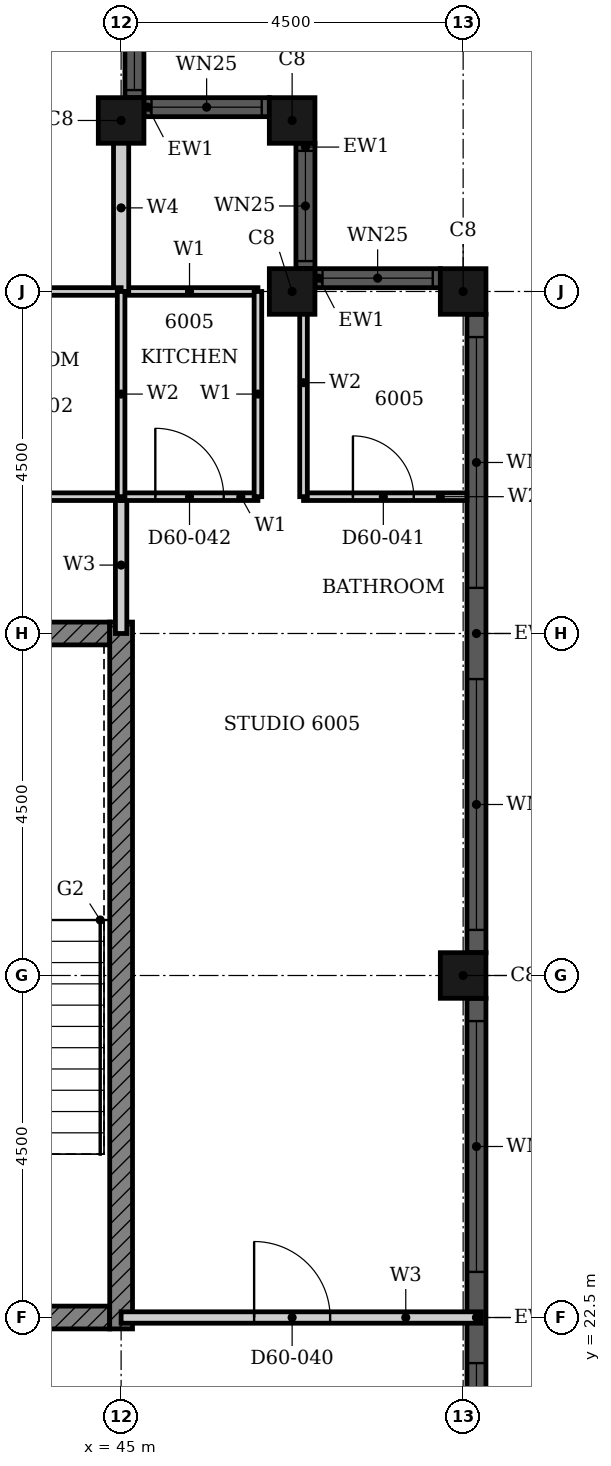
"""IFC4 building model, lengths in metres.
Left out: names, types, materials, properties, quantities, classifications, styles, units other than length and angle.
Written with IfcOpenShell. Run it as: python <this file> out.ifc"""

import sys

from ifc_helpers import new_model, si_unit, direction, frame, frame_2d, origin, origin_2d, place, context, subcontext, project, spatial, rectangle, hollow_rectangle, extrude, element, fill, save


model = new_model("IFC4")
c1 = context("Model", 3, precision=1e-05, world=origin(), true_north=direction((0.0, 1.0)))
c2 = subcontext(c1, "Body", "Model", "MODEL_VIEW")
j1 = project(units=[si_unit("LENGTHUNIT", "METRE"), si_unit("PLANEANGLEUNIT", "RADIAN")], contexts=[c1])
p1 = place(None, origin())
s1 = spatial("IfcSite", under=j1, at=p1, CompositionType="ELEMENT")
p2 = place(p1, origin())
s2 = spatial("IfcBuilding", under=s1, at=p2, CompositionType="ELEMENT")
p3 = place(p2, frame((0.0, 0.0, 237.9)))
s3 = spatial("IfcBuildingStorey", under=s2, at=p3, CompositionType="ELEMENT", Elevation=237.9)
for number, where, z_axis, x_axis in (
    (1, (49.5, 27.0, 0.0), (0.0, 0.0, 1.0), (1.0, 0.0, 0.0)),
    (2, (49.5, 36.0, 0.0), (0.0, 0.0, 1.0), (1.0, 0.0, 0.0)),
    (3, (47.25, 36.0, 0.0), (0.0, 0.0, 1.0), (1.0, 0.0, 0.0)),
    (4, (47.25, 38.25, 0.0), (0.0, 0.0, 1.0), (1.0, 0.0, 0.0)),
    (5, (45.0, 38.25, 0.0), (0.0, 0.0, 1.0), (1.0, 0.0, 0.0)),
):
    element("IfcColumn", number, at=place(p3, frame(where, z_axis=z_axis, x_axis=x_axis)), inside=s3, PredefinedType="COLUMN", context=c2, shape_type="SweptSolid", body=[
        extrude(hollow_rectangle(XDim=0.6, YDim=0.6, WallThickness=0.02, at=origin_2d()), origin(), (0.0, 0.0, 1.0), 3.7),
    ])
p4 = place(p3, frame((49.675, 18.3, 0.0), z_axis=(0.0, 0.0, 1.0), x_axis=(0.0, 1.0, 0.0)))
e6 = element("IfcWall", 6, at=p4, inside=s3, PredefinedType="SOLIDWALL", context=c2, shape_type="SweptSolid", body=[
    extrude(rectangle(XDim=8.4, YDim=0.25, at=frame_2d((4.2, 0.0))), origin(), (0.0, 0.0, 1.0), 3.7),
])
p5 = place(p4, frame((0.3, 0.0, 0.45)))
e7 = element("IfcOpeningElement", 7, at=p5, cuts=e6, PredefinedType="OPENING", context=c2, shape_type="SweptSolid", body=[
    extrude(rectangle(XDim=3.3, YDim=2.3, at=frame_2d((1.65, 1.15))), frame((0.0, 0.135, 0.0), z_axis=(0.0, -1.0, 0.0), x_axis=(1.0, 0.0, 0.0)), (0.0, 0.0, 1.0), 0.27),
])
p6 = place(p4, frame((4.8, 0.0, 0.45)))
e8 = element("IfcOpeningElement", 8, at=p6, cuts=e6, PredefinedType="OPENING", context=c2, shape_type="SweptSolid", body=[
    extrude(rectangle(XDim=3.3, YDim=2.3, at=frame_2d((1.65, 1.15))), frame((0.0, 0.135, 0.0), z_axis=(0.0, -1.0, 0.0), x_axis=(1.0, 0.0, 0.0)), (0.0, 0.0, 1.0), 0.27),
])
p7 = place(p3, frame((49.675, 27.3, 0.0), z_axis=(0.0, 0.0, 1.0), x_axis=(0.0, 1.0, 0.0)))
e9 = element("IfcWall", 9, at=p7, inside=s3, PredefinedType="SOLIDWALL", context=c2, shape_type="SweptSolid", body=[
    extrude(rectangle(XDim=8.4, YDim=0.25, at=frame_2d((4.2, 0.0))), origin(), (0.0, 0.0, 1.0), 3.7),
])
p8 = place(p7, frame((0.3, 0.0, 0.45)))
e10 = element("IfcOpeningElement", 10, at=p8, cuts=e9, PredefinedType="OPENING", context=c2, shape_type="SweptSolid", body=[
    extrude(rectangle(XDim=3.3, YDim=2.3, at=frame_2d((1.65, 1.15))), frame((0.0, 0.135, 0.0), z_axis=(0.0, -1.0, 0.0), x_axis=(1.0, 0.0, 0.0)), (0.0, 0.0, 1.0), 0.27),
])
p9 = place(p7, frame((4.8, 0.0, 0.45)))
e11 = element("IfcOpeningElement", 11, at=p9, cuts=e9, PredefinedType="OPENING", context=c2, shape_type="SweptSolid", body=[
    extrude(rectangle(XDim=3.3, YDim=2.3, at=frame_2d((1.65, 1.15))), frame((0.0, 0.135, 0.0), z_axis=(0.0, -1.0, 0.0), x_axis=(1.0, 0.0, 0.0)), (0.0, 0.0, 1.0), 0.27),
])
p10 = place(p3, frame((49.2, 36.175, 0.0), z_axis=(0.0, 0.0, 1.0), x_axis=(-1.0, 0.0, 0.0)))
e12 = element("IfcWall", 12, at=p10, inside=s3, PredefinedType="SOLIDWALL", context=c2, shape_type="SweptSolid", body=[
    extrude(rectangle(XDim=1.65, YDim=0.25, at=frame_2d((0.825, 0.0))), origin(), (0.0, 0.0, 1.0), 3.7),
])
p11 = place(p10, frame((0.1, 0.0, 0.9)))
e13 = element("IfcOpeningElement", 13, at=p11, cuts=e12, PredefinedType="OPENING", context=c2, shape_type="SweptSolid", body=[
    extrude(rectangle(XDim=1.45, YDim=1.85, at=frame_2d((0.725, 0.925))), frame((0.0, 0.135, 0.0), z_axis=(0.0, -1.0, 0.0), x_axis=(1.0, 0.0, 0.0)), (0.0, 0.0, 1.0), 0.27),
])
p12 = place(p3, frame((47.425, 36.3, 0.0), z_axis=(0.0, 0.0, 1.0), x_axis=(0.0, 1.0, 0.0)))
e14 = element("IfcWall", 14, at=p12, inside=s3, PredefinedType="SOLIDWALL", context=c2, shape_type="SweptSolid", body=[
    extrude(rectangle(XDim=1.65, YDim=0.25, at=frame_2d((0.825, 0.0))), origin(), (0.0, 0.0, 1.0), 3.7),
])
p13 = place(p12, frame((0.1, 0.0, 0.9)))
e15 = element("IfcOpeningElement", 15, at=p13, cuts=e14, PredefinedType="OPENING", context=c2, shape_type="SweptSolid", body=[
    extrude(rectangle(XDim=1.45, YDim=1.85, at=frame_2d((0.725, 0.925))), frame((0.0, 0.135, 0.0), z_axis=(0.0, -1.0, 0.0), x_axis=(1.0, 0.0, 0.0)), (0.0, 0.0, 1.0), 0.27),
])
p14 = place(p3, frame((46.95, 38.425, 0.0), z_axis=(0.0, 0.0, 1.0), x_axis=(-1.0, 0.0, 0.0)))
e16 = element("IfcWall", 16, at=p14, inside=s3, PredefinedType="SOLIDWALL", context=c2, shape_type="SweptSolid", body=[
    extrude(rectangle(XDim=1.65, YDim=0.25, at=frame_2d((0.825, 0.0))), origin(), (0.0, 0.0, 1.0), 3.7),
])
p15 = place(p14, frame((0.1, 0.0, 0.9)))
e17 = element("IfcOpeningElement", 17, at=p15, cuts=e16, PredefinedType="OPENING", context=c2, shape_type="SweptSolid", body=[
    extrude(rectangle(XDim=1.45, YDim=1.85, at=frame_2d((0.725, 0.925))), frame((0.0, 0.135, 0.0), z_axis=(0.0, -1.0, 0.0), x_axis=(1.0, 0.0, 0.0)), (0.0, 0.0, 1.0), 0.27),
])
p16 = place(p3, frame((45.175, 38.55, 0.0), z_axis=(0.0, 0.0, 1.0), x_axis=(0.0, 1.0, 0.0)))
e18 = element("IfcWall", 18, at=p16, inside=s3, PredefinedType="SOLIDWALL", context=c2, shape_type="SweptSolid", body=[
    extrude(rectangle(XDim=1.65, YDim=0.25, at=frame_2d((0.825, 0.0))), origin(), (0.0, 0.0, 1.0), 3.7),
])
p17 = place(p16, frame((0.1, 0.0, 0.9)))
e19 = element("IfcOpeningElement", 19, at=p17, cuts=e18, PredefinedType="OPENING", context=c2, shape_type="SweptSolid", body=[
    extrude(rectangle(XDim=1.45, YDim=1.85, at=frame_2d((0.725, 0.925))), frame((0.0, 0.135, 0.0), z_axis=(0.0, -1.0, 0.0), x_axis=(1.0, 0.0, 0.0)), (0.0, 0.0, 1.0), 0.27),
])
p18 = place(p3, frame((30.339, 22.5, 0.0), z_axis=(0.0, 0.0, 1.0), x_axis=(1.0, 0.0, 0.0)))
e20 = element("IfcWall", 20, at=p18, inside=s3, PredefinedType="SHEAR", context=c2, shape_type="SweptSolid", body=[
    extrude(rectangle(XDim=14.511, YDim=0.3, at=frame_2d((7.255, 0.0))), origin(), (0.0, 0.0, 1.0), 3.4),
])
p19 = place(p18, frame((7.975, 0.0, 0.0)))
e21 = element("IfcOpeningElement", 21, at=p19, cuts=e20, PredefinedType="OPENING", context=c2, shape_type="SweptSolid", body=[
    extrude(rectangle(XDim=1.8, YDim=2.1, at=frame_2d((0.9, 1.05))), frame((0.0, 0.16, 0.0), z_axis=(0.0, -1.0, 0.0), x_axis=(1.0, 0.0, 0.0)), (0.0, 0.0, 1.0), 0.32),
])
p20 = place(p3, frame((40.625, 31.5, 0.0), z_axis=(0.0, 0.0, 1.0), x_axis=(1.0, 0.0, 0.0)))
e22 = element("IfcWall", 22, at=p20, inside=s3, PredefinedType="SHEAR", context=c2, shape_type="SweptSolid", body=[
    extrude(rectangle(XDim=4.225, YDim=0.3, at=frame_2d((2.113, 0.0))), origin(), (0.0, 0.0, 1.0), 3.4),
])
p21 = place(p3, frame((45.0, 22.35, 0.0), z_axis=(0.0, 0.0, 1.0), x_axis=(0.0, 1.0, 0.0)))
e23 = element("IfcWall", 23, at=p21, inside=s3, PredefinedType="SHEAR", context=c2, shape_type="SweptSolid", body=[
    extrude(rectangle(XDim=9.3, YDim=0.3, at=frame_2d((4.65, 0.0))), origin(), (0.0, 0.0, 1.0), 3.4),
])
p22 = place(p3, frame((45.0, 22.5, 0.0), z_axis=(0.0, 0.0, 1.0), x_axis=(1.0, 0.0, 0.0)))
e24 = element("IfcWall", 24, at=p22, inside=s3, PredefinedType="PARTITIONING", context=c2, shape_type="SweptSolid", body=[
    extrude(rectangle(XDim=4.74, YDim=0.15, at=frame_2d((2.37, 0.0))), origin(), (0.0, 0.0, 1.0), 3.4),
])
p23 = place(p22, frame((1.75, 0.0, 0.0)))
e25 = element("IfcOpeningElement", 25, at=p23, cuts=e24, PredefinedType="OPENING", context=c2, shape_type="SweptSolid", body=[
    extrude(rectangle(XDim=1.0, YDim=2.2, at=frame_2d((0.5, 1.1))), frame((0.0, 0.085, 0.0), z_axis=(0.0, -1.0, 0.0), x_axis=(1.0, 0.0, 0.0)), (0.0, 0.0, 1.0), 0.17),
])
p24 = place(p3, frame((45.0, 31.5, 0.0), z_axis=(0.0, 0.0, 1.0), x_axis=(0.0, 1.0, 0.0)))
e26 = element("IfcWall", 26, at=p24, inside=s3, PredefinedType="PARTITIONING", context=c2, shape_type="SweptSolid", body=[
    extrude(rectangle(XDim=1.8, YDim=0.15, at=frame_2d((0.9, 0.0))), origin(), (0.0, 0.0, 1.0), 3.4),
])
p25 = place(p3, frame((45.0, 33.3, 0.0), z_axis=(0.0, 0.0, 1.0), x_axis=(1.0, 0.0, 0.0)))
e27 = element("IfcWall", 27, at=p25, inside=s3, PredefinedType="PARTITIONING", context=c2, shape_type="SweptSolid", body=[
    extrude(rectangle(XDim=1.8, YDim=0.1, at=frame_2d((0.9, 0.0))), origin(), (0.0, 0.0, 1.0), 3.4),
])
p26 = place(p25, frame((0.45, 0.0, 0.0)))
e28 = element("IfcOpeningElement", 28, at=p26, cuts=e27, PredefinedType="OPENING", context=c2, shape_type="SweptSolid", body=[
    extrude(rectangle(XDim=0.9, YDim=2.1, at=frame_2d((0.45, 1.05))), frame((0.0, 0.06, 0.0), z_axis=(0.0, -1.0, 0.0), x_axis=(1.0, 0.0, 0.0)), (0.0, 0.0, 1.0), 0.12),
])
p27 = place(p3, frame((45.0, 36.0, 0.0), z_axis=(0.0, 0.0, 1.0), x_axis=(1.0, 0.0, 0.0)))
e29 = element("IfcWall", 29, at=p27, inside=s3, PredefinedType="PARTITIONING", context=c2, shape_type="SweptSolid", body=[
    extrude(rectangle(XDim=1.8, YDim=0.1, at=frame_2d((0.9, 0.0))), origin(), (0.0, 0.0, 1.0), 3.4),
])
p28 = place(p3, frame((46.8, 33.3, 0.0), z_axis=(0.0, 0.0, 1.0), x_axis=(0.0, 1.0, 0.0)))
e30 = element("IfcWall", 30, at=p28, inside=s3, PredefinedType="PARTITIONING", context=c2, shape_type="SweptSolid", body=[
    extrude(rectangle(XDim=2.7, YDim=0.1, at=frame_2d((1.35, 0.0))), origin(), (0.0, 0.0, 1.0), 3.4),
])
p29 = place(p3, frame((45.0, 36.0, 0.0), z_axis=(0.0, 0.0, 1.0), x_axis=(0.0, 1.0, 0.0)))
e31 = element("IfcWall", 31, at=p29, inside=s3, PredefinedType="PARTITIONING", context=c2, shape_type="SweptSolid", body=[
    extrude(rectangle(XDim=2.2, YDim=0.2, at=frame_2d((1.1, 0.0))), origin(), (0.0, 0.0, 1.0), 3.4),
])
p30 = place(p3, frame((42.0, 33.3, 0.0), z_axis=(0.0, 0.0, 1.0), x_axis=(1.0, 0.0, 0.0)))
e32 = element("IfcWall", 32, at=p30, inside=s3, PredefinedType="PARTITIONING", context=c2, shape_type="SweptSolid", body=[
    extrude(rectangle(XDim=3.0, YDim=0.1, at=frame_2d((1.5, 0.0))), origin(), (0.0, 0.0, 1.0), 3.4),
])
p31 = place(p3, frame((47.4, 33.3, 0.0), z_axis=(0.0, 0.0, 1.0), x_axis=(1.0, 0.0, 0.0)))
e33 = element("IfcWall", 33, at=p31, inside=s3, PredefinedType="PARTITIONING", context=c2, shape_type="SweptSolid", body=[
    extrude(rectangle(XDim=2.15, YDim=0.1, at=frame_2d((1.075, 0.0))), origin(), (0.0, 0.0, 1.0), 3.4),
])
p32 = place(p31, frame((0.65, 0.0, 0.0)))
e34 = element("IfcOpeningElement", 34, at=p32, cuts=e33, PredefinedType="OPENING", context=c2, shape_type="SweptSolid", body=[
    extrude(rectangle(XDim=0.8, YDim=2.1, at=frame_2d((0.4, 1.05))), frame((0.0, 0.06, 0.0), z_axis=(0.0, -1.0, 0.0), x_axis=(1.0, 0.0, 0.0)), (0.0, 0.0, 1.0), 0.12),
])
p33 = place(p3, frame((42.0, 36.0, 0.0), z_axis=(0.0, 0.0, 1.0), x_axis=(1.0, 0.0, 0.0)))
e35 = element("IfcWall", 35, at=p33, inside=s3, PredefinedType="PARTITIONING", context=c2, shape_type="SweptSolid", body=[
    extrude(rectangle(XDim=3.0, YDim=0.1, at=frame_2d((1.5, 0.0))), origin(), (0.0, 0.0, 1.0), 3.4),
])
p34 = place(p3, frame((45.0, 33.3, 0.0), z_axis=(0.0, 0.0, 1.0), x_axis=(0.0, 1.0, 0.0)))
e36 = element("IfcWall", 36, at=p34, inside=s3, PredefinedType="PARTITIONING", context=c2, shape_type="SweptSolid", body=[
    extrude(rectangle(XDim=2.7, YDim=0.1, at=frame_2d((1.35, 0.0))), origin(), (0.0, 0.0, 1.0), 3.4),
])
p35 = place(p3, frame((47.4, 33.3, 0.0), z_axis=(0.0, 0.0, 1.0), x_axis=(0.0, 1.0, 0.0)))
e37 = element("IfcWall", 37, at=p35, inside=s3, PredefinedType="PARTITIONING", context=c2, shape_type="SweptSolid", body=[
    extrude(rectangle(XDim=3.0, YDim=0.1, at=frame_2d((1.5, 0.0))), origin(), (0.0, 0.0, 1.0), 3.4),
])
p36 = place(p5, origin())
e38 = element("IfcWindow", 38, at=p36, inside=s3, PartitioningType="SINGLE_PANEL", PredefinedType="WINDOW", context=c2, shape_type="SweptSolid", body=[
    extrude(rectangle(XDim=3.3, YDim=2.3, at=frame_2d((1.65, 1.15))), frame((0.0, 0.03, 0.0), z_axis=(0.0, -1.0, 0.0), x_axis=(1.0, 0.0, 0.0)), (0.0, 0.0, 1.0), 0.06),
])
fill(e7, e38)
p37 = place(p6, origin())
e39 = element("IfcWindow", 39, at=p37, inside=s3, PartitioningType="SINGLE_PANEL", PredefinedType="WINDOW", context=c2, shape_type="SweptSolid", body=[
    extrude(rectangle(XDim=3.3, YDim=2.3, at=frame_2d((1.65, 1.15))), frame((0.0, 0.03, 0.0), z_axis=(0.0, -1.0, 0.0), x_axis=(1.0, 0.0, 0.0)), (0.0, 0.0, 1.0), 0.06),
])
fill(e8, e39)
p38 = place(p8, origin())
e40 = element("IfcWindow", 40, at=p38, inside=s3, PartitioningType="SINGLE_PANEL", PredefinedType="WINDOW", context=c2, shape_type="SweptSolid", body=[
    extrude(rectangle(XDim=3.3, YDim=2.3, at=frame_2d((1.65, 1.15))), frame((0.0, 0.03, 0.0), z_axis=(0.0, -1.0, 0.0), x_axis=(1.0, 0.0, 0.0)), (0.0, 0.0, 1.0), 0.06),
])
fill(e10, e40)
p39 = place(p9, origin())
e41 = element("IfcWindow", 41, at=p39, inside=s3, PartitioningType="SINGLE_PANEL", PredefinedType="WINDOW", context=c2, shape_type="SweptSolid", body=[
    extrude(rectangle(XDim=3.3, YDim=2.3, at=frame_2d((1.65, 1.15))), frame((0.0, 0.03, 0.0), z_axis=(0.0, -1.0, 0.0), x_axis=(1.0, 0.0, 0.0)), (0.0, 0.0, 1.0), 0.06),
])
fill(e11, e41)
p40 = place(p11, origin())
e42 = element("IfcWindow", 42, at=p40, inside=s3, PartitioningType="SINGLE_PANEL", PredefinedType="WINDOW", context=c2, shape_type="SweptSolid", body=[
    extrude(rectangle(XDim=1.45, YDim=1.85, at=frame_2d((0.725, 0.925))), frame((0.0, 0.03, 0.0), z_axis=(0.0, -1.0, 0.0), x_axis=(1.0, 0.0, 0.0)), (0.0, 0.0, 1.0), 0.06),
])
fill(e13, e42)
p41 = place(p13, origin())
e43 = element("IfcWindow", 43, at=p41, inside=s3, PartitioningType="SINGLE_PANEL", PredefinedType="WINDOW", context=c2, shape_type="SweptSolid", body=[
    extrude(rectangle(XDim=1.45, YDim=1.85, at=frame_2d((0.725, 0.925))), frame((0.0, 0.03, 0.0), z_axis=(0.0, -1.0, 0.0), x_axis=(1.0, 0.0, 0.0)), (0.0, 0.0, 1.0), 0.06),
])
fill(e15, e43)
p42 = place(p15, origin())
e44 = element("IfcWindow", 44, at=p42, inside=s3, PartitioningType="SINGLE_PANEL", PredefinedType="WINDOW", context=c2, shape_type="SweptSolid", body=[
    extrude(rectangle(XDim=1.45, YDim=1.85, at=frame_2d((0.725, 0.925))), frame((0.0, 0.03, 0.0), z_axis=(0.0, -1.0, 0.0), x_axis=(1.0, 0.0, 0.0)), (0.0, 0.0, 1.0), 0.06),
])
fill(e17, e44)
p43 = place(p17, origin())
e45 = element("IfcWindow", 45, at=p43, inside=s3, PartitioningType="SINGLE_PANEL", PredefinedType="WINDOW", context=c2, shape_type="SweptSolid", body=[
    extrude(rectangle(XDim=1.45, YDim=1.85, at=frame_2d((0.725, 0.925))), frame((0.0, 0.03, 0.0), z_axis=(0.0, -1.0, 0.0), x_axis=(1.0, 0.0, 0.0)), (0.0, 0.0, 1.0), 0.06),
])
fill(e19, e45)
p44 = place(p23, origin())
e46 = element("IfcDoor", 46, at=p44, inside=s3, OperationType="SINGLE_SWING_LEFT", PredefinedType="DOOR", context=c2, shape_type="SweptSolid", body=[
    extrude(rectangle(XDim=1.0, YDim=2.2, at=frame_2d((0.5, 1.1))), frame((0.0, 0.025, 0.0), z_axis=(0.0, -1.0, 0.0), x_axis=(1.0, 0.0, 0.0)), (0.0, 0.0, 1.0), 0.05),
])
fill(e25, e46)
p45 = place(p32, origin())
e47 = element("IfcDoor", 47, at=p45, inside=s3, OperationType="SINGLE_SWING_LEFT", PredefinedType="DOOR", context=c2, shape_type="SweptSolid", body=[
    extrude(rectangle(XDim=0.8, YDim=2.1, at=frame_2d((0.4, 1.05))), frame((0.0, 0.025, 0.0), z_axis=(0.0, -1.0, 0.0), x_axis=(1.0, 0.0, 0.0)), (0.0, 0.0, 1.0), 0.05),
])
fill(e34, e47)
p46 = place(p26, origin())
e48 = element("IfcDoor", 48, at=p46, inside=s3, OperationType="SINGLE_SWING_RIGHT", PredefinedType="DOOR", context=c2, shape_type="SweptSolid", body=[
    extrude(rectangle(XDim=0.9, YDim=2.1, at=frame_2d((0.45, 1.05))), frame((0.0, 0.025, 0.0), z_axis=(0.0, -1.0, 0.0), x_axis=(1.0, 0.0, 0.0)), (0.0, 0.0, 1.0), 0.05),
])
fill(e28, e48)
save(model, sys.argv[1])
